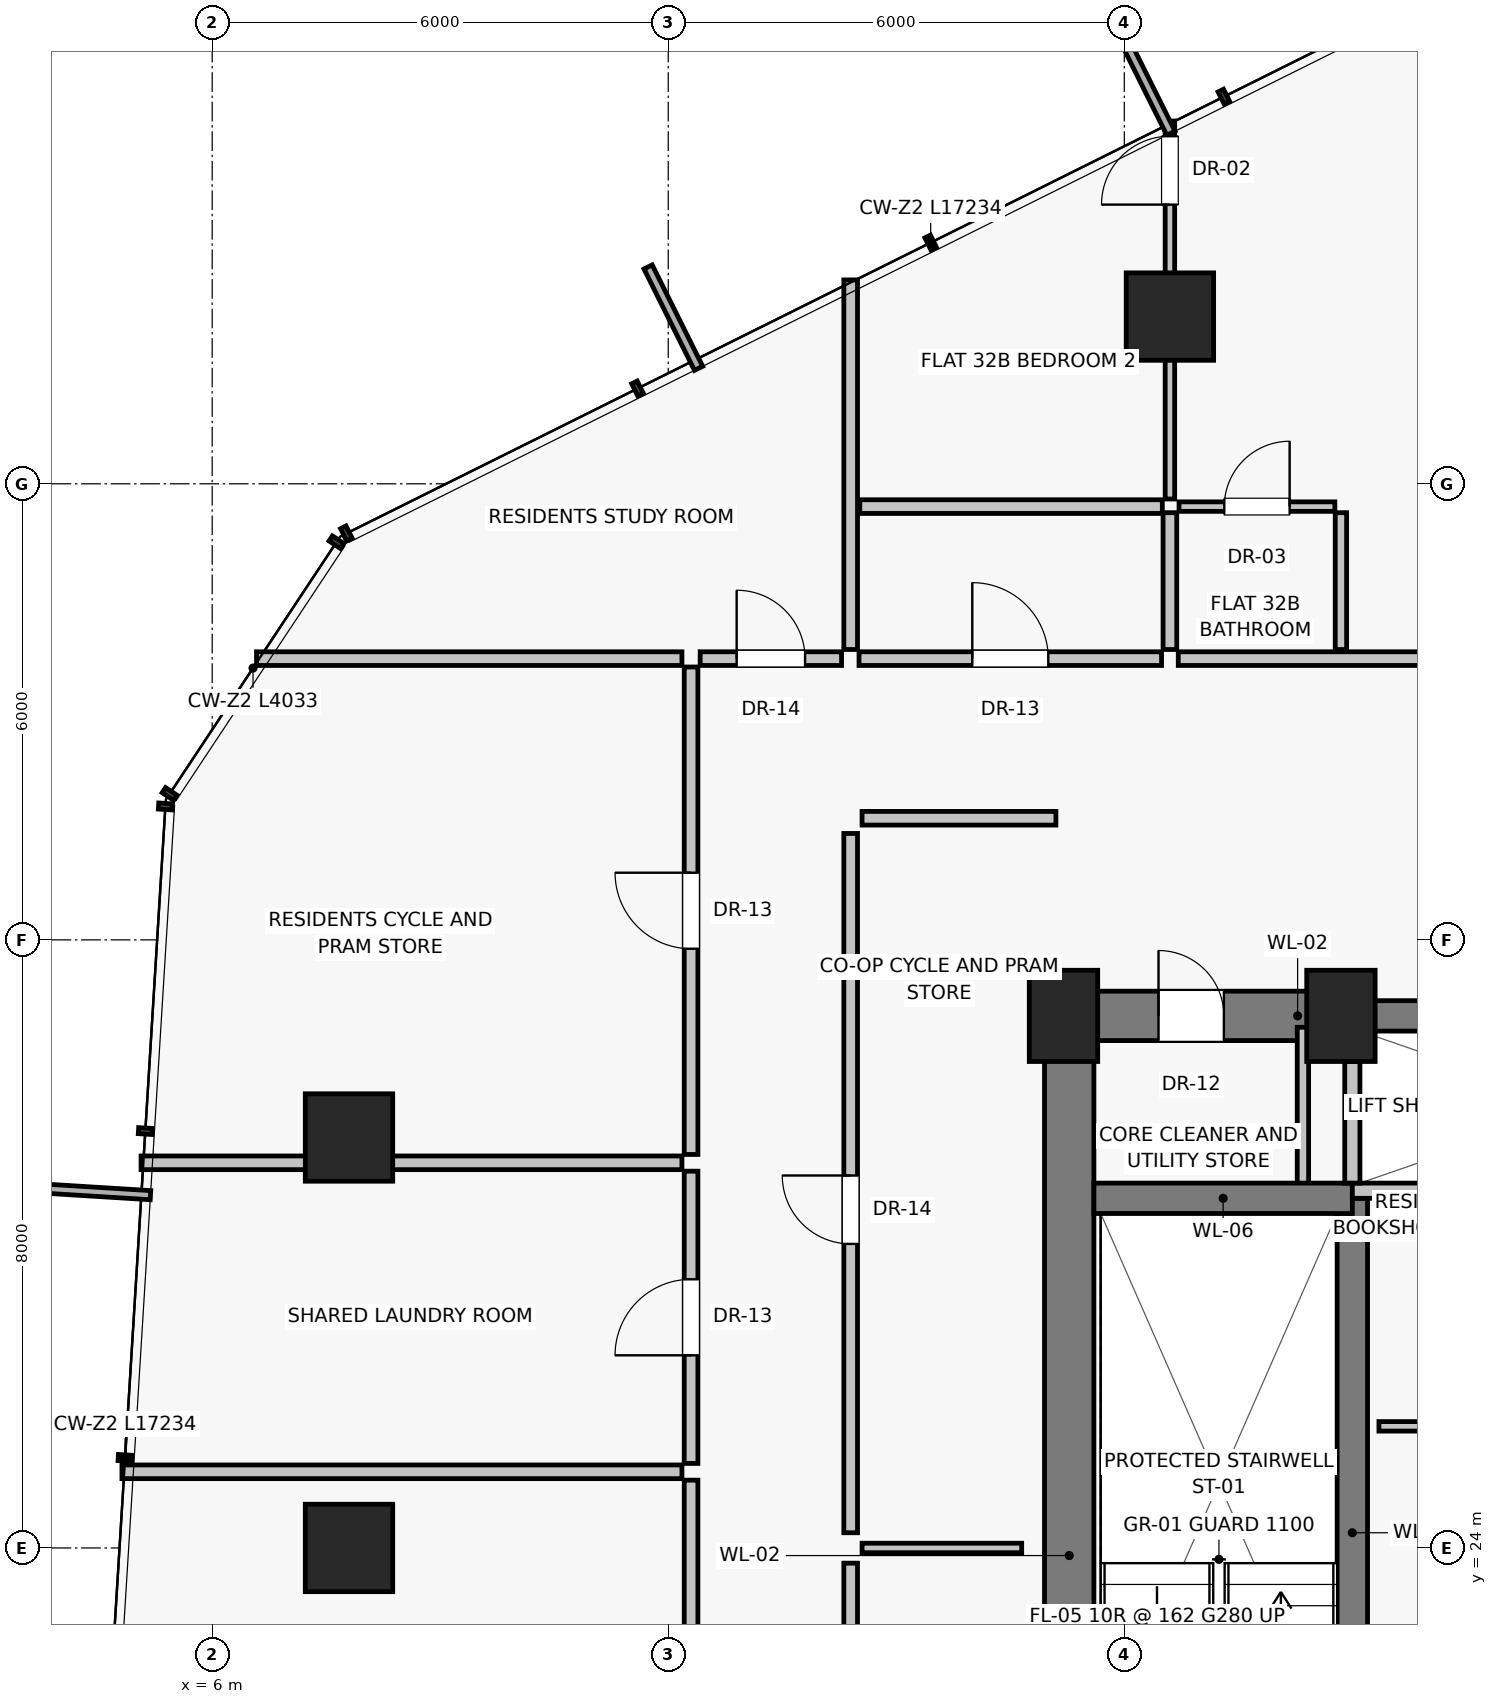
"""IFC4 building model, lengths in metres.
Left out: names, types, materials, properties, quantities, classifications, styles, units other than length and angle.
Written with IfcOpenShell. Run it as: python <this file> out.ifc"""

import sys

from ifc_helpers import new_model, si_unit, direction, frame, frame_2d, origin, origin_2d, place, context, subcontext, project, spatial, rectangle, extrude, source, transform, mapped, element, fill, save


model = new_model("IFC4")
c1 = context("Model", 3, precision=1e-05, world=origin(), true_north=direction((0.0, 1.0)))
c2 = subcontext(c1, "Body", "Model", "MODEL_VIEW")
j1 = project(units=[si_unit("LENGTHUNIT", "METRE"), si_unit("PLANEANGLEUNIT", "RADIAN")], contexts=[c1])
p1 = place(None, origin())
s1 = spatial("IfcSite", under=j1, at=p1, CompositionType="ELEMENT")
p2 = place(p1, origin())
s2 = spatial("IfcBuilding", under=s1, at=p2, CompositionType="ELEMENT")
p3 = place(p2, frame((0.0, 0.0, 116.5)))
s3 = spatial("IfcBuildingStorey", under=s2, at=p3, CompositionType="ELEMENT", Elevation=116.5)
for number, where, z_axis, x_axis in (
    (1, (17.2, 31.0, 0.0), (0.0, 0.0, 1.0), (1.0, 0.0, 0.0)),
    (2, (20.85, 31.0, 0.0), (0.0, 0.0, 1.0), (1.0, 0.0, 0.0)),
):
    element("IfcColumn", number, at=place(p3, frame(where, z_axis=z_axis, x_axis=x_axis)), inside=s3, PredefinedType="PILASTER", context=c2, shape_type="SweptSolid", body=[
        extrude(rectangle(XDim=0.9, YDim=1.2, at=origin_2d()), origin(), (0.0, 0.0, 1.0), 3.25),
    ])
for number, where, z_axis, x_axis in (
    (3, (18.6, 40.2, 0.0), (0.0, 0.0, 1.0), (1.0, 0.0, 0.0)),
    (4, (7.8, 29.4, 0.0), (0.0, 0.0, 1.0), (1.0, 0.0, 0.0)),
    (5, (7.8, 24.0, 0.0), (0.0, 0.0, 1.0), (1.0, 0.0, 0.0)),
):
    element("IfcColumn", number, at=place(p3, frame(where, z_axis=z_axis, x_axis=x_axis)), inside=s3, PredefinedType="COLUMN", context=c2, shape_type="SweptSolid", body=[
        extrude(rectangle(XDim=1.15, YDim=1.15, at=origin_2d()), origin(), (0.0, 0.0, 1.0), 3.25),
    ])
p4 = place(p3, frame((17.275, 16.8, 0.0), z_axis=(0.0, 0.0, 1.0), x_axis=(0.0, 1.0, 0.0)))
e6 = element("IfcWall", 6, at=p4, inside=s3, PredefinedType="SHEAR", context=c2, shape_type="SweptSolid", body=[
    extrude(rectangle(XDim=14.2, YDim=0.65, at=frame_2d((7.1, 0.0))), origin(), (0.0, 0.0, 1.0), 3.0),
])
p5 = place(p3, frame((17.2, 31.0, 0.0), z_axis=(0.0, 0.0, 1.0), x_axis=(1.0, 0.0, 0.0)))
e7 = element("IfcWall", 7, at=p5, inside=s3, PredefinedType="SHEAR", context=c2, shape_type="SweptSolid", body=[
    extrude(rectangle(XDim=3.8, YDim=0.65, at=frame_2d((1.9, 0.0))), origin(), (0.0, 0.0, 1.0), 3.0),
])
p6 = place(p5, frame((1.25, 0.0, 0.0)))
e8 = element("IfcOpeningElement", 8, at=p6, cuts=e7, PredefinedType="OPENING", context=c2, shape_type="SweptSolid", body=[
    extrude(rectangle(XDim=0.86, YDim=2.01, at=frame_2d((0.43, 1.005))), frame((0.0, 0.335, 0.0), z_axis=(0.0, -1.0, 0.0), x_axis=(1.0, 0.0, 0.0)), (0.0, 0.0, 1.0), 0.67),
])
p7 = place(p3, frame((21.0, 31.0, 0.0), z_axis=(0.0, 0.0, 1.0), x_axis=(1.0, 0.0, 0.0)))
e9 = element("IfcWall", 9, at=p7, inside=s3, PredefinedType="SHEAR", context=c2, shape_type="SweptSolid", body=[
    extrude(rectangle(XDim=6.0, YDim=0.4, at=frame_2d((3.0, 0.0))), origin(), (0.0, 0.0, 1.0), 3.0),
])
p8 = place(p3, frame((20.35, 28.65, 0.0), z_axis=(0.0, 0.0, 1.0), x_axis=(0.0, 1.0, 0.0)))
e10 = element("IfcWall", 10, at=p8, inside=s3, PredefinedType="PARTITIONING", context=c2, shape_type="SweptSolid", body=[
    extrude(rectangle(XDim=2.2, YDim=0.15, at=frame_2d((1.1, 0.0))), origin(), (0.0, 0.0, 1.0), 3.0),
])
p9 = place(p3, frame((21.0, 19.8, 0.0), z_axis=(0.0, 0.0, 1.0), x_axis=(0.0, 1.0, 0.0)))
e11 = element("IfcWall", 11, at=p9, inside=s3, PredefinedType="SHEAR", context=c2, shape_type="SweptSolid", body=[
    extrude(rectangle(XDim=8.8, YDim=0.4, at=frame_2d((4.4, 0.0))), origin(), (0.0, 0.0, 1.0), 3.0),
])
p10 = place(p3, frame((17.6, 28.6, 0.0), z_axis=(0.0, 0.0, 1.0), x_axis=(1.0, 0.0, 0.0)))
e12 = element("IfcWall", 12, at=p10, inside=s3, PredefinedType="SHEAR", context=c2, shape_type="SweptSolid", body=[
    extrude(rectangle(XDim=3.4, YDim=0.4, at=frame_2d((1.7, 0.0))), origin(), (0.0, 0.0, 1.0), 3.0),
])
p11 = place(p3, frame((21.0, 28.7, 0.0), z_axis=(0.0, 0.0, 1.0), x_axis=(1.0, 0.0, 0.0)))
e13 = element("IfcWall", 13, at=p11, inside=s3, PredefinedType="SOLIDWALL", context=c2, shape_type="SweptSolid", body=[
    extrude(rectangle(XDim=6.0, YDim=0.2, at=frame_2d((3.0, 0.0))), origin(), (0.0, 0.0, 1.0), 3.0),
])
p12 = place(p3, frame((21.0, 28.8, 0.0), z_axis=(0.0, 0.0, 1.0), x_axis=(0.0, 1.0, 0.0)))
e14 = element("IfcWall", 14, at=p12, inside=s3, PredefinedType="SOLIDWALL", context=c2, shape_type="SweptSolid", body=[
    extrude(rectangle(XDim=1.6, YDim=0.2, at=frame_2d((0.8, 0.0))), origin(), (0.0, 0.0, 1.0), 3.0),
])
p13 = place(p3, frame((21.35, 25.6, 0.0), z_axis=(0.0, 0.0, 1.0), x_axis=(1.0, 0.0, 0.0)))
e15 = element("IfcWall", 15, at=p13, inside=s3, PredefinedType="PARTITIONING", context=c2, shape_type="SweptSolid", body=[
    extrude(rectangle(XDim=2.4, YDim=0.125, at=frame_2d((1.2, 0.0))), origin(), (0.0, 0.0, 1.0), 3.0),
])
p14 = place(p3, frame((14.4, 14.4, 0.0), z_axis=(0.0, 0.0, 1.0), x_axis=(0.0, 1.0, 0.0)))
e16 = element("IfcWall", 16, at=p14, inside=s3, PredefinedType="PARTITIONING", context=c2, shape_type="SweptSolid", body=[
    extrude(rectangle(XDim=9.4, YDim=0.18, at=frame_2d((4.7, 0.0))), origin(), (0.0, 0.0, 1.0), 3.0),
])
p15 = place(p14, frame((3.8, 0.0, 0.0)))
e17 = element("IfcOpeningElement", 17, at=p15, cuts=e16, PredefinedType="OPENING", context=c2, shape_type="SweptSolid", body=[
    extrude(rectangle(XDim=0.9, YDim=2.01, at=frame_2d((0.45, 1.005))), frame((0.0, 0.1, 0.0), z_axis=(0.0, -1.0, 0.0), x_axis=(1.0, 0.0, 0.0)), (0.0, 0.0, 1.0), 0.2),
])
p16 = place(p3, frame((14.4, 24.2, 0.0), z_axis=(0.0, 0.0, 1.0), x_axis=(0.0, 1.0, 0.0)))
e18 = element("IfcWall", 18, at=p16, inside=s3, PredefinedType="PARTITIONING", context=c2, shape_type="SweptSolid", body=[
    extrude(rectangle(XDim=9.2, YDim=0.18, at=frame_2d((4.6, 0.0))), origin(), (0.0, 0.0, 1.0), 3.0),
])
p17 = place(p16, frame((3.8, 0.0, 0.0)))
e19 = element("IfcOpeningElement", 19, at=p17, cuts=e18, PredefinedType="OPENING", context=c2, shape_type="SweptSolid", body=[
    extrude(rectangle(XDim=0.9, YDim=2.01, at=frame_2d((0.45, 1.005))), frame((0.0, 0.1, 0.0), z_axis=(0.0, -1.0, 0.0), x_axis=(1.0, 0.0, 0.0)), (0.0, 0.0, 1.0), 0.2),
])
p18 = place(p3, frame((14.55, 24.0, 0.0), z_axis=(0.0, 0.0, 1.0), x_axis=(1.0, 0.0, 0.0)))
e20 = element("IfcWall", 20, at=p18, inside=s3, PredefinedType="PARTITIONING", context=c2, shape_type="SweptSolid", body=[
    extrude(rectangle(XDim=2.1, YDim=0.125, at=frame_2d((1.05, 0.0))), origin(), (0.0, 0.0, 1.0), 3.0),
])
p19 = place(p3, frame((14.55, 33.6, 0.0), z_axis=(0.0, 0.0, 1.0), x_axis=(1.0, 0.0, 0.0)))
e21 = element("IfcWall", 21, at=p19, inside=s3, PredefinedType="PARTITIONING", context=c2, shape_type="SweptSolid", body=[
    extrude(rectangle(XDim=2.55, YDim=0.18, at=frame_2d((1.275, 0.0))), origin(), (0.0, 0.0, 1.0), 3.0),
])
p20 = place(p3, frame((14.4, 35.82, 0.0), z_axis=(0.0, 0.0, 1.0), x_axis=(0.0, 1.0, 0.0)))
e22 = element("IfcWall", 22, at=p20, inside=s3, PredefinedType="PARTITIONING", context=c2, shape_type="SweptSolid", body=[
    extrude(rectangle(XDim=4.863, YDim=0.18, at=frame_2d((2.431, 0.0))), origin(), (0.0, 0.0, 1.0), 3.0),
])
p21 = place(p3, frame((14.51, 35.7, 0.0), z_axis=(0.0, 0.0, 1.0), x_axis=(1.0, 0.0, 0.0)))
e23 = element("IfcWall", 23, at=p21, inside=s3, PredefinedType="PARTITIONING", context=c2, shape_type="SweptSolid", body=[
    extrude(rectangle(XDim=3.98, YDim=0.18, at=frame_2d((1.99, 0.0))), origin(), (0.0, 0.0, 1.0), 2.58),
])
p22 = place(p21, frame((1.49, 0.0, 0.0)))
e24 = element("IfcOpeningElement", 24, at=p22, cuts=e23, PredefinedType="OPENING", context=c2, shape_type="SweptSolid", body=[
    extrude(rectangle(XDim=1.0, YDim=2.01, at=frame_2d((0.5, 1.005))), frame((0.0, 0.1, 0.0), z_axis=(0.0, -1.0, 0.0), x_axis=(1.0, 0.0, 0.0)), (0.0, 0.0, 1.0), 0.2),
])
p23 = place(p3, frame((18.71, 35.7, 0.0), z_axis=(0.0, 0.0, 1.0), x_axis=(1.0, 0.0, 0.0)))
e25 = element("IfcWall", 25, at=p23, inside=s3, PredefinedType="PARTITIONING", context=c2, shape_type="SweptSolid", body=[
    extrude(rectangle(XDim=14.78, YDim=0.18, at=frame_2d((7.39, 0.0))), origin(), (0.0, 0.0, 1.0), 2.58),
])
p24 = place(p23, frame((5.94, 0.0, 0.0)))
e26 = element("IfcOpeningElement", 26, at=p24, cuts=e25, PredefinedType="OPENING", context=c2, shape_type="SweptSolid", body=[
    extrude(rectangle(XDim=0.95, YDim=2.02, at=frame_2d((0.475, 1.01))), frame((0.0, 0.1, 0.0), z_axis=(0.0, -1.0, 0.0), x_axis=(1.0, 0.0, 0.0)), (0.0, 0.0, 1.0), 0.2),
])
p25 = place(p3, frame((14.52, 37.7, 0.0), z_axis=(0.0, 0.0, 1.0), x_axis=(1.0, 0.0, 0.0)))
e27 = element("IfcWall", 27, at=p25, inside=s3, PredefinedType="PARTITIONING", context=c2, shape_type="SweptSolid", body=[
    extrude(rectangle(XDim=3.98, YDim=0.18, at=frame_2d((1.99, 0.0))), origin(), (0.0, 0.0, 1.0), 3.0),
])
p26 = place(p3, frame((18.6, 35.82, 0.0), z_axis=(0.0, 0.0, 1.0), x_axis=(0.0, 1.0, 0.0)))
e28 = element("IfcWall", 28, at=p26, inside=s3, PredefinedType="PARTITIONING", context=c2, shape_type="SweptSolid", body=[
    extrude(rectangle(XDim=1.8, YDim=0.18, at=frame_2d((0.9, 0.0))), origin(), (0.0, 0.0, 1.0), 2.378),
])
p27 = place(p3, frame((18.6, 37.8, 0.0), z_axis=(0.0, 0.0, 1.0), x_axis=(0.0, 1.0, 0.0)))
e29 = element("IfcWall", 29, at=p27, inside=s3, PredefinedType="PARTITIONING", context=c2, shape_type="SweptSolid", body=[
    extrude(rectangle(XDim=4.973, YDim=0.125, at=frame_2d((2.486, 0.0))), origin(), (0.0, 0.0, 1.0), 2.378),
])
p28 = place(p27, frame((3.873, 0.0, 0.0)))
e30 = element("IfcOpeningElement", 30, at=p28, cuts=e29, PredefinedType="OPENING", context=c2, shape_type="SweptSolid", body=[
    extrude(rectangle(XDim=0.9, YDim=2.01, at=frame_2d((0.45, 1.005))), frame((0.0, 0.073, 0.0), z_axis=(0.0, -1.0, 0.0), x_axis=(1.0, 0.0, 0.0)), (0.0, 0.0, 1.0), 0.145),
])
p29 = place(p3, frame((20.85, 35.82, 0.0), z_axis=(0.0, 0.0, 1.0), x_axis=(0.0, 1.0, 0.0)))
e31 = element("IfcWall", 31, at=p29, inside=s3, PredefinedType="PARTITIONING", context=c2, shape_type="SweptSolid", body=[
    extrude(rectangle(XDim=1.8, YDim=0.15, at=frame_2d((0.9, 0.0))), origin(), (0.0, 0.0, 1.0), 3.0),
])
p30 = place(p3, frame((18.72, 37.7, 0.0), z_axis=(0.0, 0.0, 1.0), x_axis=(1.0, 0.0, 0.0)))
e32 = element("IfcWall", 32, at=p30, inside=s3, PredefinedType="PARTITIONING", context=c2, shape_type="SweptSolid", body=[
    extrude(rectangle(XDim=2.05, YDim=0.125, at=frame_2d((1.025, 0.0))), origin(), (0.0, 0.0, 1.0), 3.0),
])
p31 = place(p30, frame((0.595, 0.0, 0.0)))
e33 = element("IfcOpeningElement", 33, at=p31, cuts=e32, PredefinedType="OPENING", context=c2, shape_type="SweptSolid", body=[
    extrude(rectangle(XDim=0.86, YDim=2.01, at=frame_2d((0.43, 1.005))), frame((0.0, 0.073, 0.0), z_axis=(0.0, -1.0, 0.0), x_axis=(1.0, 0.0, 0.0)), (0.0, 0.0, 1.0), 0.145),
])
p32 = place(p3, frame((12.18, 35.7, 0.0), z_axis=(0.0, 0.0, 1.0), x_axis=(-1.0, 0.0, 0.0)))
e34 = element("IfcWall", 34, at=p32, inside=s3, PredefinedType="PARTITIONING", context=c2, shape_type="SweptSolid", body=[
    extrude(rectangle(XDim=5.596, YDim=0.18, at=frame_2d((2.798, 0.0))), origin(), (0.0, 0.0, 1.0), 3.0),
])
p33 = place(p3, frame((12.3, 17.113, 0.0), z_axis=(0.0, 0.0, 1.0), x_axis=(0.0, 1.0, 0.0)))
e35 = element("IfcWall", 35, at=p33, inside=s3, PredefinedType="PARTITIONING", context=c2, shape_type="SweptSolid", body=[
    extrude(rectangle(XDim=7.779, YDim=0.18, at=frame_2d((3.89, 0.0))), origin(), (0.0, 0.0, 1.0), 2.58),
])
p34 = place(p33, frame((3.389, 0.0, 0.0)))
e36 = element("IfcOpeningElement", 36, at=p34, cuts=e35, PredefinedType="OPENING", context=c2, shape_type="SweptSolid", body=[
    extrude(rectangle(XDim=1.0, YDim=2.01, at=frame_2d((0.5, 1.005))), frame((0.0, 0.1, 0.0), z_axis=(0.0, -1.0, 0.0), x_axis=(1.0, 0.0, 0.0)), (0.0, 0.0, 1.0), 0.2),
])
p35 = place(p3, frame((12.18, 25.002, 0.0), z_axis=(0.0, 0.0, 1.0), x_axis=(-1.0, 0.0, 0.0)))
e37 = element("IfcWall", 37, at=p35, inside=s3, PredefinedType="PARTITIONING", context=c2, shape_type="SweptSolid", body=[
    extrude(rectangle(XDim=7.367, YDim=0.18, at=frame_2d((3.684, 0.0))), origin(), (0.0, 0.0, 1.0), 3.0),
])
p36 = place(p3, frame((12.3, 25.112, 0.0), z_axis=(0.0, 0.0, 1.0), x_axis=(0.0, 1.0, 0.0)))
e38 = element("IfcWall", 38, at=p36, inside=s3, PredefinedType="PARTITIONING", context=c2, shape_type="SweptSolid", body=[
    extrude(rectangle(XDim=3.845, YDim=0.18, at=frame_2d((1.922, 0.0))), origin(), (0.0, 0.0, 1.0), 2.58),
])
p37 = place(p36, frame((1.423, 0.0, 0.0)))
e39 = element("IfcOpeningElement", 39, at=p37, cuts=e38, PredefinedType="OPENING", context=c2, shape_type="SweptSolid", body=[
    extrude(rectangle(XDim=1.0, YDim=2.01, at=frame_2d((0.5, 1.005))), frame((0.0, 0.1, 0.0), z_axis=(0.0, -1.0, 0.0), x_axis=(1.0, 0.0, 0.0)), (0.0, 0.0, 1.0), 0.2),
])
p38 = place(p3, frame((12.3, 29.177, 0.0), z_axis=(0.0, 0.0, 1.0), x_axis=(0.0, 1.0, 0.0)))
e40 = element("IfcWall", 40, at=p38, inside=s3, PredefinedType="PARTITIONING", context=c2, shape_type="SweptSolid", body=[
    extrude(rectangle(XDim=6.413, YDim=0.18, at=frame_2d((3.207, 0.0))), origin(), (0.0, 0.0, 1.0), 2.58),
])
p39 = place(p38, frame((2.707, 0.0, 0.0)))
e41 = element("IfcOpeningElement", 41, at=p39, cuts=e40, PredefinedType="OPENING", context=c2, shape_type="SweptSolid", body=[
    extrude(rectangle(XDim=1.0, YDim=2.01, at=frame_2d((0.5, 1.005))), frame((0.0, 0.1, 0.0), z_axis=(0.0, -1.0, 0.0), x_axis=(1.0, 0.0, 0.0)), (0.0, 0.0, 1.0), 0.2),
])
p40 = place(p3, frame((12.18, 29.067, 0.0), z_axis=(0.0, 0.0, 1.0), x_axis=(-1.0, 0.0, 0.0)))
e42 = element("IfcWall", 42, at=p40, inside=s3, PredefinedType="PARTITIONING", context=c2, shape_type="SweptSolid", body=[
    extrude(rectangle(XDim=7.116, YDim=0.18, at=frame_2d((3.558, 0.0))), origin(), (0.0, 0.0, 1.0), 2.378),
])
p41 = place(p3, frame((12.42, 35.7, 0.0), z_axis=(0.0, 0.0, 1.0), x_axis=(1.0, 0.0, 0.0)))
e43 = element("IfcWall", 43, at=p41, inside=s3, PredefinedType="PARTITIONING", context=c2, shape_type="SweptSolid", body=[
    extrude(rectangle(XDim=1.86, YDim=0.18, at=frame_2d((0.93, 0.0))), origin(), (0.0, 0.0, 1.0), 3.0),
])
p42 = place(p41, frame((0.48, 0.0, 0.0)))
e44 = element("IfcOpeningElement", 44, at=p42, cuts=e43, PredefinedType="OPENING", context=c2, shape_type="SweptSolid", body=[
    extrude(rectangle(XDim=0.9, YDim=2.01, at=frame_2d((0.45, 1.005))), frame((0.0, 0.1, 0.0), z_axis=(0.0, -1.0, 0.0), x_axis=(1.0, 0.0, 0.0)), (0.0, 0.0, 1.0), 0.2),
])
m1 = source(origin(), c2, "Body", "SweptSolid", [
    extrude(rectangle(XDim=0.86, YDim=2.01, at=frame_2d((0.43, 1.005))), frame((0.0, 0.025, 0.0), z_axis=(0.0, -1.0, 0.0), x_axis=(1.0, 0.0, 0.0)), (0.0, 0.0, 1.0), 0.05),
])
p43 = place(p6, origin())
e45 = element("IfcDoor", 45, at=p43, inside=s3, OperationType="SINGLE_SWING_LEFT", PredefinedType="DOOR", context=c2, shape_type="MappedRepresentation", body=[
    mapped(m1, transform((0.0, 0.0, 0.0), scale=1.0)),
])
fill(e8, e45)
m2 = source(origin(), c2, "Body", "SweptSolid", [
    extrude(rectangle(XDim=0.9, YDim=2.01, at=frame_2d((0.45, 1.005))), frame((0.0, 0.025, 0.0), z_axis=(0.0, -1.0, 0.0), x_axis=(1.0, 0.0, 0.0)), (0.0, 0.0, 1.0), 0.05),
])
p44 = place(p17, origin())
e46 = element("IfcDoor", 46, at=p44, inside=s3, OperationType="SINGLE_SWING_RIGHT", PredefinedType="DOOR", context=c2, shape_type="MappedRepresentation", body=[
    mapped(m2, transform((0.0, 0.0, 0.0), scale=1.0)),
])
fill(e19, e46)
m3 = source(origin(), c2, "Body", "SweptSolid", [
    extrude(rectangle(XDim=1.0, YDim=2.01, at=frame_2d((0.5, 1.005))), frame((0.0, 0.025, 0.0), z_axis=(0.0, -1.0, 0.0), x_axis=(1.0, 0.0, 0.0)), (0.0, 0.0, 1.0), 0.05),
])
p45 = place(p22, origin())
e47 = element("IfcDoor", 47, at=p45, inside=s3, OperationType="SINGLE_SWING_LEFT", PredefinedType="DOOR", context=c2, shape_type="MappedRepresentation", body=[
    mapped(m3, transform((0.0, 0.0, 0.0), scale=1.0)),
])
fill(e24, e47)
p46 = place(p28, origin())
e48 = element("IfcDoor", 48, at=p46, inside=s3, OperationType="SINGLE_SWING_LEFT", PredefinedType="DOOR", context=c2, shape_type="MappedRepresentation", body=[
    mapped(m2, transform((0.0, 0.0, 0.0), scale=1.0)),
])
fill(e30, e48)
p47 = place(p31, origin())
e49 = element("IfcDoor", 49, at=p47, inside=s3, OperationType="SINGLE_SWING_RIGHT", PredefinedType="DOOR", context=c2, shape_type="MappedRepresentation", body=[
    mapped(m1, transform((0.0, 0.0, 0.0), scale=1.0)),
])
fill(e33, e49)
p48 = place(p37, origin())
e50 = element("IfcDoor", 50, at=p48, inside=s3, OperationType="SINGLE_SWING_LEFT", PredefinedType="DOOR", context=c2, shape_type="MappedRepresentation", body=[
    mapped(m3, transform((0.0, 0.0, 0.0), scale=1.0)),
])
fill(e39, e50)
p49 = place(p39, origin())
e51 = element("IfcDoor", 51, at=p49, inside=s3, OperationType="SINGLE_SWING_RIGHT", PredefinedType="DOOR", context=c2, shape_type="MappedRepresentation", body=[
    mapped(m3, transform((0.0, 0.0, 0.0), scale=1.0)),
])
fill(e41, e51)
p50 = place(p42, origin())
e52 = element("IfcDoor", 52, at=p50, inside=s3, OperationType="SINGLE_SWING_LEFT", PredefinedType="DOOR", context=c2, shape_type="MappedRepresentation", body=[
    mapped(m2, transform((0.0, 0.0, 0.0), scale=1.0)),
])
fill(e44, e52)
save(model, sys.argv[1])
